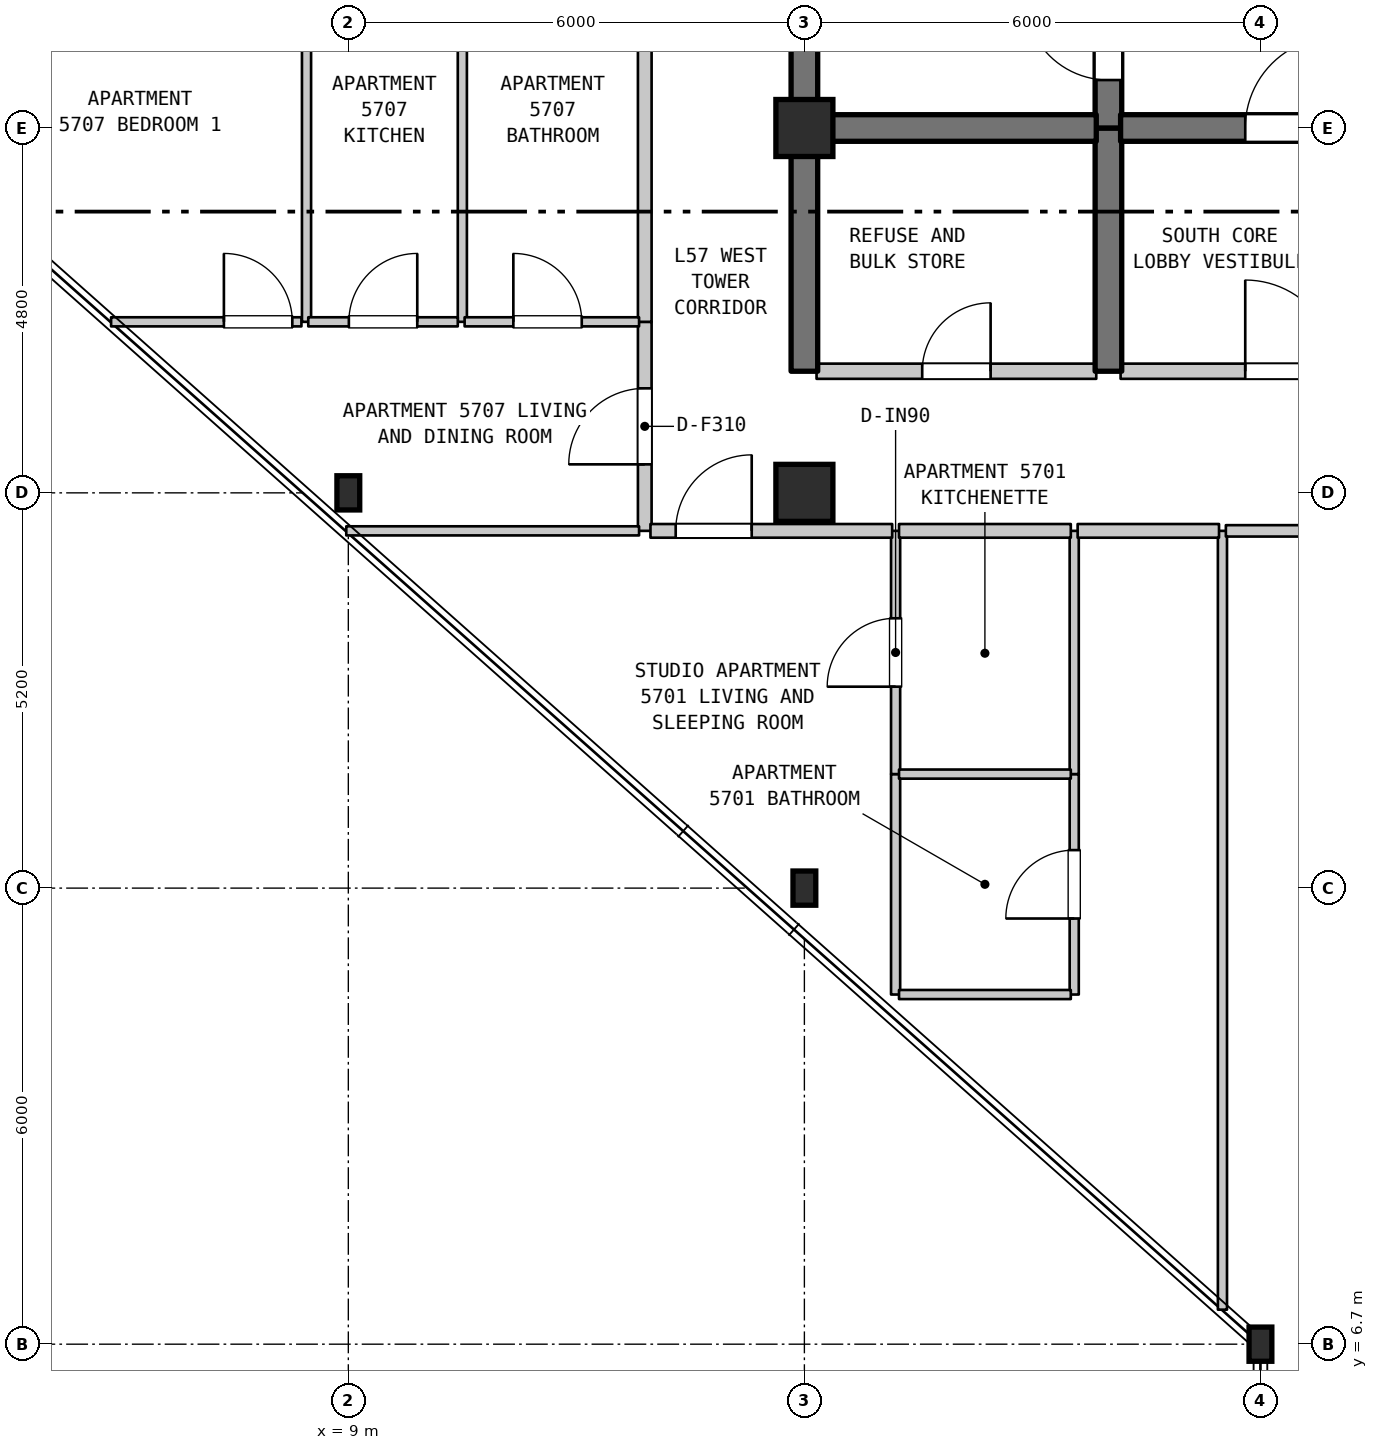
"""IFC4 building model, lengths in metres.
Left out: names, types, materials, properties, quantities, classifications, styles, units other than length and angle.
Written with IfcOpenShell. Run it as: python <this file> out.ifc"""

import sys

from ifc_helpers import new_model, si_unit, direction, frame, frame_2d, origin, origin_2d, place, context, subcontext, project, spatial, rectangle, i_section, extrude, element, fill, save


model = new_model("IFC4")
c1 = context("Model", 3, precision=1e-05, world=origin(), true_north=direction((0.0, 1.0)))
c2 = subcontext(c1, "Body", "Model", "MODEL_VIEW")
j1 = project(units=[si_unit("LENGTHUNIT", "METRE"), si_unit("PLANEANGLEUNIT", "RADIAN")], contexts=[c1])
p1 = place(None, origin())
s1 = spatial("IfcSite", under=j1, at=p1, CompositionType="ELEMENT")
p2 = place(p1, origin())
s2 = spatial("IfcBuilding", under=s1, at=p2, CompositionType="ELEMENT")
p3 = place(p2, frame((0.0, 0.0, 230.2)))
s3 = spatial("IfcBuildingStorey", under=s2, at=p3, CompositionType="ELEMENT", Elevation=230.2)
for number, where, z_axis, x_axis in (
    (1, (9.0, 17.9, 0.0), (0.0, 0.0, 1.0), (1.0, 0.0, 0.0)),
    (2, (15.0, 12.7, 0.0), (0.0, 0.0, 1.0), (1.0, 0.0, 0.0)),
):
    element("IfcColumn", number, at=place(p3, frame(where, z_axis=z_axis, x_axis=x_axis)), inside=s3, PredefinedType="COLUMN", context=c2, shape_type="SweptSolid", body=[
        extrude(i_section(OverallWidth=0.3, OverallDepth=0.45, WebThickness=0.014, FlangeThickness=0.026, FilletRadius=0.027, at=origin_2d()), origin(), (0.0, 0.0, 1.0), 3.7),
    ])
for number, where, z_axis, x_axis in (
    (3, (15.0, 17.9, 0.0), (0.0, 0.0, 1.0), (1.0, 0.0, 0.0)),
    (4, (15.0, 22.7, 0.0), (0.0, 0.0, 1.0), (1.0, 0.0, 0.0)),
):
    element("IfcColumn", number, at=place(p3, frame(where, z_axis=z_axis, x_axis=x_axis)), inside=s3, PredefinedType="COLUMN", context=c2, shape_type="SweptSolid", body=[
        extrude(rectangle(XDim=0.75, YDim=0.75, at=origin_2d()), origin(), (0.0, 0.0, 1.0), 3.7),
    ])
p4 = place(p3, frame((21.0, 6.7, 0.0), z_axis=(0.0, 0.0, 1.0), x_axis=(1.0, 0.0, 0.0)))
e5 = element("IfcColumn", 5, at=p4, inside=s3, PredefinedType="COLUMN", context=c2, shape_type="SweptSolid", body=[
    extrude(i_section(OverallWidth=0.3, OverallDepth=0.45, WebThickness=0.014, FlangeThickness=0.026, FilletRadius=0.027, at=origin_2d()), origin(), (0.0, 0.0, 1.0), 3.7),
])
for number, where, z_axis, x_axis in (
    (6, (8.45, 20.15, 0.0), (0.0, 0.0, 1.0), (0.0, 1.0, 0.0)),
    (7, (10.5, 20.15, 0.0), (0.0, 0.0, 1.0), (0.0, 1.0, 0.0)),
):
    element("IfcWall", number, at=place(p3, frame(where, z_axis=z_axis, x_axis=x_axis)), inside=s3, PredefinedType="PARTITIONING", context=c2, shape_type="SweptSolid", body=[
        extrude(rectangle(XDim=4.97, YDim=0.12, at=frame_2d((2.485, 0.0))), origin(), (0.0, 0.0, 1.0), 3.39),
    ])
p5 = place(p3, frame((12.9, 17.4, 0.0), z_axis=(0.0, 0.0, 1.0), x_axis=(0.0, 1.0, 0.0)))
e8 = element("IfcWall", 8, at=p5, inside=s3, PredefinedType="STANDARD", context=c2, shape_type="SweptSolid", body=[
    extrude(rectangle(XDim=2.75, YDim=0.18, at=frame_2d((1.375, 0.0))), origin(), (0.0, 0.0, 1.0), 3.39),
])
p6 = place(p5, frame((0.875, 0.0, 0.0)))
e9 = element("IfcOpeningElement", 9, at=p6, cuts=e8, PredefinedType="OPENING", context=c2, shape_type="SweptSolid", body=[
    extrude(rectangle(XDim=1.0, YDim=2.15, at=frame_2d((0.5, 1.075))), frame((0.0, 0.1, 0.0), z_axis=(0.0, -1.0, 0.0), x_axis=(1.0, 0.0, 0.0)), (0.0, 0.0, 1.0), 0.2),
])
p7 = place(p3, frame((12.9, 20.15, 0.0), z_axis=(0.0, 0.0, 1.0), x_axis=(0.0, 1.0, 0.0)))
e10 = element("IfcWall", 10, at=p7, inside=s3, PredefinedType="STANDARD", context=c2, shape_type="SweptSolid", body=[
    extrude(rectangle(XDim=4.97, YDim=0.18, at=frame_2d((2.485, 0.0))), origin(), (0.0, 0.0, 1.0), 3.39),
])
p8 = place(p3, frame((15.0, 19.5, 0.0), z_axis=(0.0, 0.0, 1.0), x_axis=(0.0, 1.0, 0.0)))
e11 = element("IfcWall", 11, at=p8, inside=s3, PredefinedType="SHEAR", context=c2, shape_type="SweptSolid", body=[
    extrude(rectangle(XDim=3.2, YDim=0.35, at=frame_2d((1.6, 0.0))), origin(), (0.0, 0.0, 1.0), 3.39),
])
p9 = place(p3, frame((15.0, 22.7, 0.0), z_axis=(0.0, 0.0, 1.0), x_axis=(0.0, 1.0, 0.0)))
e12 = element("IfcWall", 12, at=p9, inside=s3, PredefinedType="SHEAR", context=c2, shape_type="SweptSolid", body=[
    extrude(rectangle(XDim=6.8, YDim=0.35, at=frame_2d((3.4, 0.0))), origin(), (0.0, 0.0, 1.0), 3.39),
])
p10 = place(p3, frame((16.2, 11.3, 0.0), z_axis=(0.0, 0.0, 1.0), x_axis=(0.0, 1.0, 0.0)))
e13 = element("IfcWall", 13, at=p10, inside=s3, PredefinedType="PARTITIONING", context=c2, shape_type="SweptSolid", body=[
    extrude(rectangle(XDim=2.9, YDim=0.12, at=frame_2d((1.45, 0.0))), origin(), (0.0, 0.0, 1.0), 3.39),
])
p11 = place(p3, frame((16.2, 14.2, 0.0), z_axis=(0.0, 0.0, 1.0), x_axis=(0.0, 1.0, 0.0)))
e14 = element("IfcWall", 14, at=p11, inside=s3, PredefinedType="PARTITIONING", context=c2, shape_type="SweptSolid", body=[
    extrude(rectangle(XDim=3.2, YDim=0.12, at=frame_2d((1.6, 0.0))), origin(), (0.0, 0.0, 1.0), 3.39),
])
p12 = place(p11, frame((1.15, 0.0, 0.0)))
e15 = element("IfcOpeningElement", 15, at=p12, cuts=e14, PredefinedType="OPENING", context=c2, shape_type="SweptSolid", body=[
    extrude(rectangle(XDim=0.9, YDim=2.15, at=frame_2d((0.45, 1.075))), frame((0.0, 0.07, 0.0), z_axis=(0.0, -1.0, 0.0), x_axis=(1.0, 0.0, 0.0)), (0.0, 0.0, 1.0), 0.14),
])
p13 = place(p3, frame((18.55, 11.3, 0.0), z_axis=(0.0, 0.0, 1.0), x_axis=(0.0, 1.0, 0.0)))
e16 = element("IfcWall", 16, at=p13, inside=s3, PredefinedType="PARTITIONING", context=c2, shape_type="SweptSolid", body=[
    extrude(rectangle(XDim=2.9, YDim=0.12, at=frame_2d((1.45, 0.0))), origin(), (0.0, 0.0, 1.0), 3.39),
])
p14 = place(p13, frame((1.0, 0.0, 0.0)))
e17 = element("IfcOpeningElement", 17, at=p14, cuts=e16, PredefinedType="OPENING", context=c2, shape_type="SweptSolid", body=[
    extrude(rectangle(XDim=0.9, YDim=2.1, at=frame_2d((0.45, 1.05))), frame((0.0, 0.07, 0.0), z_axis=(0.0, -1.0, 0.0), x_axis=(1.0, 0.0, 0.0)), (0.0, 0.0, 1.0), 0.14),
])
p15 = place(p3, frame((18.55, 14.2, 0.0), z_axis=(0.0, 0.0, 1.0), x_axis=(0.0, 1.0, 0.0)))
e18 = element("IfcWall", 18, at=p15, inside=s3, PredefinedType="PARTITIONING", context=c2, shape_type="SweptSolid", body=[
    extrude(rectangle(XDim=3.2, YDim=0.12, at=frame_2d((1.6, 0.0))), origin(), (0.0, 0.0, 1.0), 3.39),
])
p16 = place(p3, frame((19.0, 19.5, 0.0), z_axis=(0.0, 0.0, 1.0), x_axis=(0.0, 1.0, 0.0)))
e19 = element("IfcWall", 19, at=p16, inside=s3, PredefinedType="SHEAR", context=c2, shape_type="SweptSolid", body=[
    extrude(rectangle(XDim=3.2, YDim=0.35, at=frame_2d((1.6, 0.0))), origin(), (0.0, 0.0, 1.0), 3.39),
])
p17 = place(p3, frame((19.0, 22.7, 0.0), z_axis=(0.0, 0.0, 1.0), x_axis=(0.0, 1.0, 0.0)))
e20 = element("IfcWall", 20, at=p17, inside=s3, PredefinedType="SHEAR", context=c2, shape_type="SweptSolid", body=[
    extrude(rectangle(XDim=5.5, YDim=0.35, at=frame_2d((2.75, 0.0))), origin(), (0.0, 0.0, 1.0), 3.39),
])
p18 = place(p17, frame((0.631, 0.0, 0.0)))
e21 = element("IfcOpeningElement", 21, at=p18, cuts=e20, PredefinedType="OPENING", context=c2, shape_type="SweptSolid", body=[
    extrude(rectangle(XDim=1.1, YDim=2.15, at=frame_2d((0.55, 1.075))), frame((0.0, 0.185, 0.0), z_axis=(0.0, -1.0, 0.0), x_axis=(1.0, 0.0, 0.0)), (0.0, 0.0, 1.0), 0.37),
])
p19 = place(p3, frame((20.5, 7.154, 0.0), z_axis=(0.0, 0.0, 1.0), x_axis=(0.0, 1.0, 0.0)))
e22 = element("IfcWall", 22, at=p19, inside=s3, PredefinedType="PARTITIONING", context=c2, shape_type="SweptSolid", body=[
    extrude(rectangle(XDim=10.246, YDim=0.12, at=frame_2d((5.123, 0.0))), origin(), (0.0, 0.0, 1.0), 3.39),
])
for number, where, z_axis, x_axis in (
    (23, (16.245, 11.3, 0.0), (0.0, 0.0, 1.0), (1.0, 0.0, 0.0)),
    (24, (16.245, 14.2, 0.0), (0.0, 0.0, 1.0), (1.0, 0.0, 0.0)),
):
    element("IfcWall", number, at=place(p3, frame(where, z_axis=z_axis, x_axis=x_axis)), inside=s3, PredefinedType="PARTITIONING", context=c2, shape_type="SweptSolid", body=[
        extrude(rectangle(XDim=2.26, YDim=0.12, at=frame_2d((1.13, 0.0))), origin(), (0.0, 0.0, 1.0), 3.39),
    ])
p20 = place(p3, frame((8.973, 17.4, 0.0), z_axis=(0.0, 0.0, 1.0), x_axis=(1.0, 0.0, 0.0)))
e25 = element("IfcWall", 25, at=p20, inside=s3, PredefinedType="PARTITIONING", context=c2, shape_type="SweptSolid", body=[
    extrude(rectangle(XDim=3.852, YDim=0.12, at=frame_2d((1.926, 0.0))), origin(), (0.0, 0.0, 1.0), 3.39),
])
p21 = place(p3, frame((12.975, 17.4, 0.0), z_axis=(0.0, 0.0, 1.0), x_axis=(1.0, 0.0, 0.0)))
e26 = element("IfcWall", 26, at=p21, inside=s3, PredefinedType="STANDARD", context=c2, shape_type="SweptSolid", body=[
    extrude(rectangle(XDim=3.18, YDim=0.18, at=frame_2d((1.59, 0.0))), origin(), (0.0, 0.0, 1.0), 3.39),
])
p22 = place(p21, frame((0.332, 0.0, 0.0)))
e27 = element("IfcOpeningElement", 27, at=p22, cuts=e26, PredefinedType="OPENING", context=c2, shape_type="SweptSolid", body=[
    extrude(rectangle(XDim=1.0, YDim=2.15, at=frame_2d((0.5, 1.075))), frame((0.0, 0.1, 0.0), z_axis=(0.0, -1.0, 0.0), x_axis=(1.0, 0.0, 0.0)), (0.0, 0.0, 1.0), 0.2),
])
p23 = place(p3, frame((16.245, 17.4, 0.0), z_axis=(0.0, 0.0, 1.0), x_axis=(1.0, 0.0, 0.0)))
e28 = element("IfcWall", 28, at=p23, inside=s3, PredefinedType="STANDARD", context=c2, shape_type="SweptSolid", body=[
    extrude(rectangle(XDim=2.26, YDim=0.18, at=frame_2d((1.13, 0.0))), origin(), (0.0, 0.0, 1.0), 3.39),
])
p24 = place(p3, frame((18.595, 17.4, 0.0), z_axis=(0.0, 0.0, 1.0), x_axis=(1.0, 0.0, 0.0)))
e29 = element("IfcWall", 29, at=p24, inside=s3, PredefinedType="STANDARD", context=c2, shape_type="SweptSolid", body=[
    extrude(rectangle(XDim=1.86, YDim=0.18, at=frame_2d((0.93, 0.0))), origin(), (0.0, 0.0, 1.0), 3.39),
])
p25 = place(p3, frame((20.545, 17.4, 0.0), z_axis=(0.0, 0.0, 1.0), x_axis=(1.0, 0.0, 0.0)))
e30 = element("IfcWall", 30, at=p25, inside=s3, PredefinedType="STANDARD", context=c2, shape_type="SweptSolid", body=[
    extrude(rectangle(XDim=4.91, YDim=0.15, at=frame_2d((2.455, 0.0))), origin(), (0.0, 0.0, 1.0), 3.39),
])
p26 = place(p25, frame((1.884, 0.0, 0.0)))
e31 = element("IfcOpeningElement", 31, at=p26, cuts=e30, PredefinedType="OPENING", context=c2, shape_type="SweptSolid", body=[
    extrude(rectangle(XDim=1.0, YDim=2.15, at=frame_2d((0.5, 1.075))), frame((0.0, 0.085, 0.0), z_axis=(0.0, -1.0, 0.0), x_axis=(1.0, 0.0, 0.0)), (0.0, 0.0, 1.0), 0.17),
])
p27 = place(p3, frame((15.16, 19.5, 0.0), z_axis=(0.0, 0.0, 1.0), x_axis=(1.0, 0.0, 0.0)))
e32 = element("IfcWall", 32, at=p27, inside=s3, PredefinedType="STANDARD", context=c2, shape_type="SweptSolid", body=[
    extrude(rectangle(XDim=3.68, YDim=0.2, at=frame_2d((1.84, 0.0))), origin(), (0.0, 0.0, 1.0), 3.39),
])
p28 = place(p27, frame((1.39, 0.0, 0.0)))
e33 = element("IfcOpeningElement", 33, at=p28, cuts=e32, PredefinedType="OPENING", context=c2, shape_type="SweptSolid", body=[
    extrude(rectangle(XDim=0.9, YDim=2.15, at=frame_2d((0.45, 1.075))), frame((0.0, 0.11, 0.0), z_axis=(0.0, -1.0, 0.0), x_axis=(1.0, 0.0, 0.0)), (0.0, 0.0, 1.0), 0.22),
])
p29 = place(p3, frame((19.16, 19.5, 0.0), z_axis=(0.0, 0.0, 1.0), x_axis=(1.0, 0.0, 0.0)))
e34 = element("IfcWall", 34, at=p29, inside=s3, PredefinedType="STANDARD", context=c2, shape_type="SweptSolid", body=[
    extrude(rectangle(XDim=4.48, YDim=0.2, at=frame_2d((2.24, 0.0))), origin(), (0.0, 0.0, 1.0), 3.39),
])
p30 = place(p29, frame((1.64, 0.0, 0.0)))
e35 = element("IfcOpeningElement", 35, at=p30, cuts=e34, PredefinedType="OPENING", context=c2, shape_type="SweptSolid", body=[
    extrude(rectangle(XDim=1.2, YDim=2.2, at=frame_2d((0.6, 1.1))), frame((0.0, 0.11, 0.0), z_axis=(0.0, -1.0, 0.0), x_axis=(1.0, 0.0, 0.0)), (0.0, 0.0, 1.0), 0.22),
])
p31 = place(p3, frame((5.879, 20.15, 0.0), z_axis=(0.0, 0.0, 1.0), x_axis=(1.0, 0.0, 0.0)))
e36 = element("IfcWall", 36, at=p31, inside=s3, PredefinedType="PARTITIONING", context=c2, shape_type="SweptSolid", body=[
    extrude(rectangle(XDim=2.504, YDim=0.12, at=frame_2d((1.252, 0.0))), origin(), (0.0, 0.0, 1.0), 3.39),
])
p32 = place(p31, frame((1.484, 0.0, 0.0)))
e37 = element("IfcOpeningElement", 37, at=p32, cuts=e36, PredefinedType="OPENING", context=c2, shape_type="SweptSolid", body=[
    extrude(rectangle(XDim=0.9, YDim=2.15, at=frame_2d((0.45, 1.075))), frame((0.0, 0.07, 0.0), z_axis=(0.0, -1.0, 0.0), x_axis=(1.0, 0.0, 0.0)), (0.0, 0.0, 1.0), 0.14),
])
p33 = place(p3, frame((8.473, 20.15, 0.0), z_axis=(0.0, 0.0, 1.0), x_axis=(1.0, 0.0, 0.0)))
e38 = element("IfcWall", 38, at=p33, inside=s3, PredefinedType="PARTITIONING", context=c2, shape_type="SweptSolid", body=[
    extrude(rectangle(XDim=1.967, YDim=0.12, at=frame_2d((0.983, 0.0))), origin(), (0.0, 0.0, 1.0), 3.39),
])
p34 = place(p33, frame((0.534, 0.0, 0.0)))
e39 = element("IfcOpeningElement", 39, at=p34, cuts=e38, PredefinedType="OPENING", context=c2, shape_type="SweptSolid", body=[
    extrude(rectangle(XDim=0.9, YDim=2.15, at=frame_2d((0.45, 1.075))), frame((0.0, 0.07, 0.0), z_axis=(0.0, -1.0, 0.0), x_axis=(1.0, 0.0, 0.0)), (0.0, 0.0, 1.0), 0.14),
])
p35 = place(p3, frame((10.53, 20.15, 0.0), z_axis=(0.0, 0.0, 1.0), x_axis=(1.0, 0.0, 0.0)))
e40 = element("IfcWall", 40, at=p35, inside=s3, PredefinedType="PARTITIONING", context=c2, shape_type="SweptSolid", body=[
    extrude(rectangle(XDim=2.295, YDim=0.12, at=frame_2d((1.147, 0.0))), origin(), (0.0, 0.0, 1.0), 3.39),
])
p36 = place(p35, frame((0.641, 0.0, 0.0)))
e41 = element("IfcOpeningElement", 41, at=p36, cuts=e40, PredefinedType="OPENING", context=c2, shape_type="SweptSolid", body=[
    extrude(rectangle(XDim=0.9, YDim=2.1, at=frame_2d((0.45, 1.05))), frame((0.0, 0.07, 0.0), z_axis=(0.0, -1.0, 0.0), x_axis=(1.0, 0.0, 0.0)), (0.0, 0.0, 1.0), 0.14),
])
p37 = place(p3, frame((15.16, 22.7, 0.0), z_axis=(0.0, 0.0, 1.0), x_axis=(1.0, 0.0, 0.0)))
e42 = element("IfcWall", 42, at=p37, inside=s3, PredefinedType="SHEAR", context=c2, shape_type="SweptSolid", body=[
    extrude(rectangle(XDim=3.68, YDim=0.35, at=frame_2d((1.84, 0.0))), origin(), (0.0, 0.0, 1.0), 3.39),
])
p38 = place(p3, frame((19.16, 22.7, 0.0), z_axis=(0.0, 0.0, 1.0), x_axis=(1.0, 0.0, 0.0)))
e43 = element("IfcWall", 43, at=p38, inside=s3, PredefinedType="SHEAR", context=c2, shape_type="SweptSolid", body=[
    extrude(rectangle(XDim=4.48, YDim=0.35, at=frame_2d((2.24, 0.0))), origin(), (0.0, 0.0, 1.0), 3.39),
])
p39 = place(p38, frame((1.64, 0.0, 0.0)))
e44 = element("IfcOpeningElement", 44, at=p39, cuts=e43, PredefinedType="OPENING", context=c2, shape_type="SweptSolid", body=[
    extrude(rectangle(XDim=1.2, YDim=2.2, at=frame_2d((0.6, 1.1))), frame((0.0, 0.185, 0.0), z_axis=(0.0, -1.0, 0.0), x_axis=(1.0, 0.0, 0.0)), (0.0, 0.0, 1.0), 0.37),
])
p40 = place(p6, origin())
e45 = element("IfcDoor", 45, at=p40, inside=s3, OperationType="SINGLE_SWING_LEFT", PredefinedType="DOOR", context=c2, shape_type="SweptSolid", body=[
    extrude(rectangle(XDim=1.0, YDim=2.15, at=frame_2d((0.5, 1.075))), frame((0.0, 0.025, 0.0), z_axis=(0.0, -1.0, 0.0), x_axis=(1.0, 0.0, 0.0)), (0.0, 0.0, 1.0), 0.05),
])
fill(e9, e45)
p41 = place(p12, origin())
e46 = element("IfcDoor", 46, at=p41, inside=s3, OperationType="SINGLE_SWING_LEFT", PredefinedType="DOOR", context=c2, shape_type="SweptSolid", body=[
    extrude(rectangle(XDim=0.9, YDim=2.15, at=frame_2d((0.45, 1.075))), frame((0.0, 0.025, 0.0), z_axis=(0.0, -1.0, 0.0), x_axis=(1.0, 0.0, 0.0)), (0.0, 0.0, 1.0), 0.05),
])
fill(e15, e46)
p42 = place(p14, origin())
e47 = element("IfcDoor", 47, at=p42, inside=s3, OperationType="SINGLE_SWING_LEFT", PredefinedType="DOOR", context=c2, shape_type="SweptSolid", body=[
    extrude(rectangle(XDim=0.9, YDim=2.1, at=frame_2d((0.45, 1.05))), frame((0.0, 0.025, 0.0), z_axis=(0.0, -1.0, 0.0), x_axis=(1.0, 0.0, 0.0)), (0.0, 0.0, 1.0), 0.05),
])
fill(e17, e47)
p43 = place(p18, origin())
e48 = element("IfcDoor", 48, at=p43, inside=s3, OperationType="SINGLE_SWING_RIGHT", PredefinedType="DOOR", context=c2, shape_type="SweptSolid", body=[
    extrude(rectangle(XDim=1.1, YDim=2.15, at=frame_2d((0.55, 1.075))), frame((0.0, 0.025, 0.0), z_axis=(0.0, -1.0, 0.0), x_axis=(1.0, 0.0, 0.0)), (0.0, 0.0, 1.0), 0.05),
])
fill(e21, e48)
p44 = place(p22, origin())
e49 = element("IfcDoor", 49, at=p44, inside=s3, OperationType="SINGLE_SWING_RIGHT", PredefinedType="DOOR", context=c2, shape_type="SweptSolid", body=[
    extrude(rectangle(XDim=1.0, YDim=2.15, at=frame_2d((0.5, 1.075))), frame((0.0, 0.025, 0.0), z_axis=(0.0, -1.0, 0.0), x_axis=(1.0, 0.0, 0.0)), (0.0, 0.0, 1.0), 0.05),
])
fill(e27, e49)
p45 = place(p28, origin())
e50 = element("IfcDoor", 50, at=p45, inside=s3, OperationType="SINGLE_SWING_RIGHT", PredefinedType="DOOR", context=c2, shape_type="SweptSolid", body=[
    extrude(rectangle(XDim=0.9, YDim=2.15, at=frame_2d((0.45, 1.075))), frame((0.0, 0.025, 0.0), z_axis=(0.0, -1.0, 0.0), x_axis=(1.0, 0.0, 0.0)), (0.0, 0.0, 1.0), 0.05),
])
fill(e33, e50)
p46 = place(p30, origin())
e51 = element("IfcDoor", 51, at=p46, inside=s3, OperationType="SINGLE_SWING_LEFT", PredefinedType="DOOR", context=c2, shape_type="SweptSolid", body=[
    extrude(rectangle(XDim=1.2, YDim=2.2, at=frame_2d((0.6, 1.1))), frame((0.0, 0.025, 0.0), z_axis=(0.0, -1.0, 0.0), x_axis=(1.0, 0.0, 0.0)), (0.0, 0.0, 1.0), 0.05),
])
fill(e35, e51)
p47 = place(p32, origin())
e52 = element("IfcDoor", 52, at=p47, inside=s3, OperationType="SINGLE_SWING_LEFT", PredefinedType="DOOR", context=c2, shape_type="SweptSolid", body=[
    extrude(rectangle(XDim=0.9, YDim=2.15, at=frame_2d((0.45, 1.075))), frame((0.0, 0.025, 0.0), z_axis=(0.0, -1.0, 0.0), x_axis=(1.0, 0.0, 0.0)), (0.0, 0.0, 1.0), 0.05),
])
fill(e37, e52)
p48 = place(p34, origin())
e53 = element("IfcDoor", 53, at=p48, inside=s3, OperationType="SINGLE_SWING_RIGHT", PredefinedType="DOOR", context=c2, shape_type="SweptSolid", body=[
    extrude(rectangle(XDim=0.9, YDim=2.15, at=frame_2d((0.45, 1.075))), frame((0.0, 0.025, 0.0), z_axis=(0.0, -1.0, 0.0), x_axis=(1.0, 0.0, 0.0)), (0.0, 0.0, 1.0), 0.05),
])
fill(e39, e53)
p49 = place(p36, origin())
e54 = element("IfcDoor", 54, at=p49, inside=s3, OperationType="SINGLE_SWING_LEFT", PredefinedType="DOOR", context=c2, shape_type="SweptSolid", body=[
    extrude(rectangle(XDim=0.9, YDim=2.1, at=frame_2d((0.45, 1.05))), frame((0.0, 0.025, 0.0), z_axis=(0.0, -1.0, 0.0), x_axis=(1.0, 0.0, 0.0)), (0.0, 0.0, 1.0), 0.05),
])
fill(e41, e54)
p50 = place(p39, origin())
e55 = element("IfcDoor", 55, at=p50, inside=s3, OperationType="SINGLE_SWING_RIGHT", PredefinedType="DOOR", context=c2, shape_type="SweptSolid", body=[
    extrude(rectangle(XDim=1.2, YDim=2.2, at=frame_2d((0.6, 1.1))), frame((0.0, 0.025, 0.0), z_axis=(0.0, -1.0, 0.0), x_axis=(1.0, 0.0, 0.0)), (0.0, 0.0, 1.0), 0.05),
])
fill(e44, e55)
save(model, sys.argv[1])
